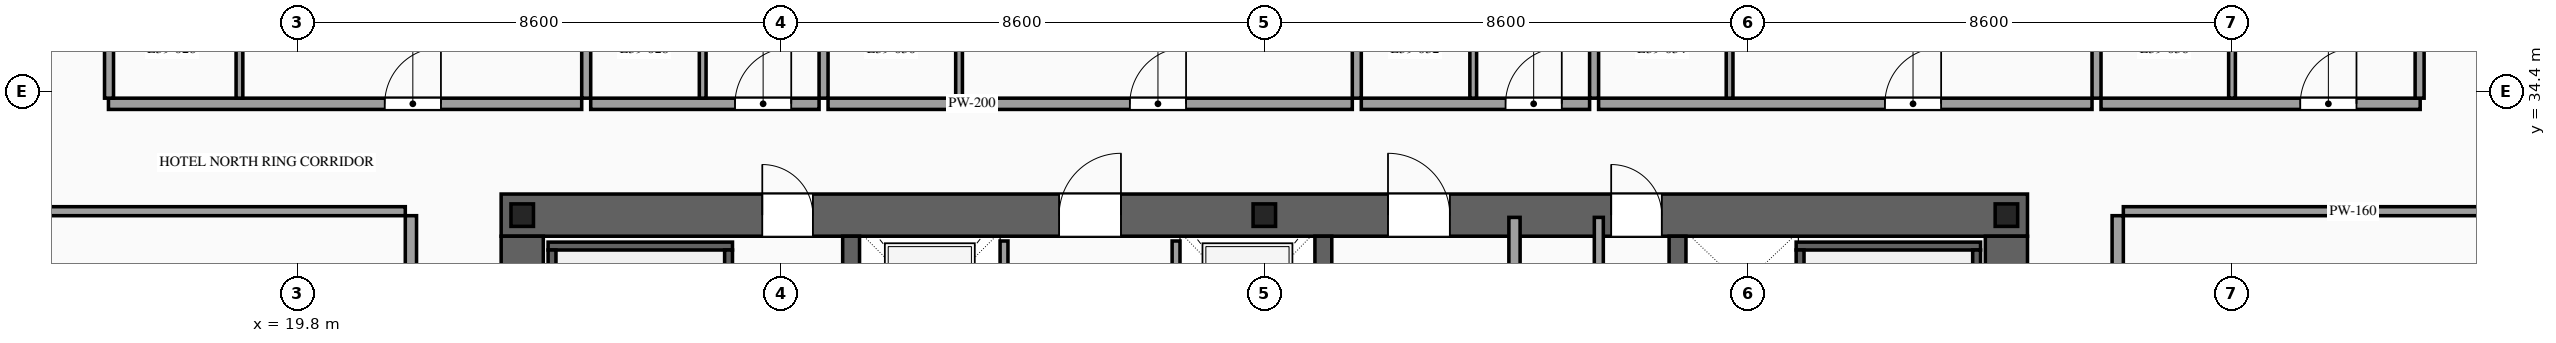
"""IFC4 building model, lengths in metres.
Left out: names, types, materials, properties, quantities, classifications, styles, units other than length and angle.
Written with IfcOpenShell. Run it as: python <this file> out.ifc"""

import sys

from ifc_helpers import new_model, si_unit, direction, frame, frame_2d, origin, origin_2d, place, context, subcontext, project, spatial, rectangle, i_section, extrude, source, transform, mapped, element, fill, save


model = new_model("IFC4")
c1 = context("Model", 3, precision=1e-05, world=origin(), true_north=direction((0.0, 1.0)))
c2 = subcontext(c1, "Body", "Model", "MODEL_VIEW")
j1 = project(units=[si_unit("LENGTHUNIT", "METRE"), si_unit("PLANEANGLEUNIT", "RADIAN")], contexts=[c1])
p1 = place(None, origin())
s1 = spatial("IfcSite", under=j1, at=p1, CompositionType="ELEMENT")
p2 = place(p1, origin())
s2 = spatial("IfcBuilding", under=s1, at=p2, CompositionType="ELEMENT")
p3 = place(p2, frame((0.0, 0.0, 148.8)))
s3 = spatial("IfcBuildingStorey", under=s2, at=p3, CompositionType="ELEMENT", Elevation=148.8)
p4 = place(p3, frame((23.425, 32.2, 0.0), z_axis=(0.0, 0.0, 1.0), x_axis=(1.0, 0.0, 0.0)))
e1 = element("IfcWall", 1, at=p4, inside=s3, PredefinedType="SHEAR", context=c2, shape_type="SweptSolid", body=[
    extrude(rectangle(XDim=27.15, YDim=0.75, at=frame_2d((13.575, 0.0))), origin(), (0.0, 0.0, 1.0), 3.6),
])
p5 = place(p4, frame((4.645, 0.0, 0.0)))
e2 = element("IfcOpeningElement", 2, at=p5, cuts=e1, PredefinedType="OPENING", context=c2, shape_type="SweptSolid", body=[
    extrude(rectangle(XDim=0.9, YDim=2.15, at=frame_2d((0.45, 1.075))), frame((0.0, 0.39, 0.0), z_axis=(0.0, -1.0, 0.0), x_axis=(1.0, 0.0, 0.0)), (0.0, 0.0, 1.0), 0.78),
])
p6 = place(p4, frame((9.925, 0.0, 0.0)))
e3 = element("IfcOpeningElement", 3, at=p6, cuts=e1, PredefinedType="OPENING", context=c2, shape_type="SweptSolid", body=[
    extrude(rectangle(XDim=1.1, YDim=2.2, at=frame_2d((0.55, 1.1))), frame((0.0, 0.39, 0.0), z_axis=(0.0, -1.0, 0.0), x_axis=(1.0, 0.0, 0.0)), (0.0, 0.0, 1.0), 0.78),
])
p7 = place(p4, frame((15.775, 0.0, 0.0)))
e4 = element("IfcOpeningElement", 4, at=p7, cuts=e1, PredefinedType="OPENING", context=c2, shape_type="SweptSolid", body=[
    extrude(rectangle(XDim=1.1, YDim=2.2, at=frame_2d((0.55, 1.1))), frame((0.0, 0.39, 0.0), z_axis=(0.0, -1.0, 0.0), x_axis=(1.0, 0.0, 0.0)), (0.0, 0.0, 1.0), 0.78),
])
p8 = place(p4, frame((19.745, 0.0, 0.0)))
e5 = element("IfcOpeningElement", 5, at=p8, cuts=e1, PredefinedType="OPENING", context=c2, shape_type="SweptSolid", body=[
    extrude(rectangle(XDim=0.9, YDim=2.15, at=frame_2d((0.45, 1.075))), frame((0.0, 0.39, 0.0), z_axis=(0.0, -1.0, 0.0), x_axis=(1.0, 0.0, 0.0)), (0.0, 0.0, 1.0), 0.78),
])
m1 = source(origin(), c2, "Body", "SweptSolid", [
    extrude(rectangle(XDim=12.05, YDim=0.75, at=frame_2d((6.025, 0.0))), origin(), (0.0, 0.0, 1.0), 3.6),
])
for number, where, z_axis, x_axis in (
    (6, (23.8, 19.775, 0.0), (0.0, 0.0, 1.0), (0.0, 1.0, 0.0)),
    (7, (50.2, 19.775, 0.0), (0.0, 0.0, 1.0), (0.0, 1.0, 0.0)),
):
    element("IfcWall", number, at=place(p3, frame(where, z_axis=z_axis, x_axis=x_axis)), inside=s3, PredefinedType="SHEAR", context=c2, shape_type="MappedRepresentation", body=[
        mapped(m1, transform((0.0, 0.0, 0.0), scale=1.0)),
    ])
m2 = source(origin(), c2, "Body", "SweptSolid", [
    extrude(rectangle(XDim=12.05, YDim=0.3, at=frame_2d((6.025, 0.0))), origin(), (0.0, 0.0, 1.0), 3.6),
])
for number, where, z_axis, x_axis in (
    (8, (29.65, 19.775, 0.0), (0.0, 0.0, 1.0), (0.0, 1.0, 0.0)),
    (9, (38.05, 19.775, 0.0), (0.0, 0.0, 1.0), (0.0, 1.0, 0.0)),
    (10, (44.35, 19.775, 0.0), (0.0, 0.0, 1.0), (0.0, 1.0, 0.0)),
):
    element("IfcWall", number, at=place(p3, frame(where, z_axis=z_axis, x_axis=x_axis)), inside=s3, PredefinedType="SOLIDWALL", context=c2, shape_type="MappedRepresentation", body=[
        mapped(m2, transform((0.0, 0.0, 0.0), scale=1.0)),
    ])
m3 = source(origin(), c2, "Body", "SweptSolid", [
    extrude(i_section(OverallWidth=0.4, OverallDepth=0.4, WebThickness=0.013, FlangeThickness=0.021, at=origin_2d()), origin(), (0.0, 0.0, 1.0), 3.6),
])
for number, where, z_axis, x_axis in (
    (11, (23.8, 32.2, 0.0), (0.0, 0.0, 1.0), (1.0, 0.0, 0.0)),
    (12, (37.0, 32.2, 0.0), (0.0, 0.0, 1.0), (1.0, 0.0, 0.0)),
    (13, (50.2, 32.2, 0.0), (0.0, 0.0, 1.0), (1.0, 0.0, 0.0)),
):
    element("IfcColumn", number, at=place(p3, frame(where, z_axis=z_axis, x_axis=x_axis)), inside=s3, PredefinedType="COLUMN", context=c2, shape_type="MappedRepresentation", body=[
        mapped(m3, transform((0.0, 0.0, 0.0), scale=1.0)),
    ])
p9 = place(p3, frame((32.37, 29.4, 0.0), z_axis=(0.0, 0.0, 1.0), x_axis=(0.0, 1.0, 0.0)))
e14 = element("IfcWall", 14, at=p9, inside=s3, PredefinedType="SOLIDWALL", context=c2, shape_type="SweptSolid", body=[
    extrude(rectangle(XDim=2.34, YDim=0.14, at=frame_2d((1.17, 0.0))), origin(), (0.0, 0.0, 1.0), 3.38),
])
p10 = place(p9, frame((0.62, 0.0, 0.0)))
e15 = element("IfcOpeningElement", 15, at=p10, cuts=e14, PredefinedType="OPENING", context=c2, shape_type="SweptSolid", body=[
    extrude(rectangle(XDim=1.1, YDim=2.2, at=frame_2d((0.55, 1.1))), frame((0.0, 0.085, 0.0), z_axis=(0.0, -1.0, 0.0), x_axis=(1.0, 0.0, 0.0)), (0.0, 0.0, 1.0), 0.17),
])
p11 = place(p3, frame((35.43, 29.4, 0.0), z_axis=(0.0, 0.0, 1.0), x_axis=(0.0, 1.0, 0.0)))
e16 = element("IfcWall", 16, at=p11, inside=s3, PredefinedType="SOLIDWALL", context=c2, shape_type="SweptSolid", body=[
    extrude(rectangle(XDim=2.34, YDim=0.14, at=frame_2d((1.17, 0.0))), origin(), (0.0, 0.0, 1.0), 3.38),
])
p12 = place(p11, frame((0.62, 0.0, 0.0)))
e17 = element("IfcOpeningElement", 17, at=p12, cuts=e16, PredefinedType="OPENING", context=c2, shape_type="SweptSolid", body=[
    extrude(rectangle(XDim=1.1, YDim=2.2, at=frame_2d((0.55, 1.1))), frame((0.0, 0.085, 0.0), z_axis=(0.0, -1.0, 0.0), x_axis=(1.0, 0.0, 0.0)), (0.0, 0.0, 1.0), 0.17),
])
m4 = source(origin(), c2, "Body", "SweptSolid", [
    extrude(rectangle(XDim=3.28, YDim=0.14, at=frame_2d((1.64, 0.0))), origin(), (0.0, 0.0, 1.0), 3.38),
])
p13 = place(p3, frame((24.26, 31.65, 0.0), z_axis=(0.0, 0.0, 1.0), x_axis=(1.0, 0.0, 0.0)))
e18 = element("IfcWall", 18, at=p13, inside=s3, PredefinedType="SOLIDWALL", context=c2, shape_type="MappedRepresentation", body=[
    mapped(m4, transform((0.0, 0.0, 0.0), scale=1.0)),
])
m5 = source(origin(), c2, "Body", "SweptSolid", [
    extrude(rectangle(XDim=8.94, YDim=0.14, at=frame_2d((4.47, 0.0))), origin(), (0.0, 0.0, 1.0), 3.38),
])
for number, where, z_axis, x_axis in (
    (19, (24.33, 22.64, 0.0), (0.0, 0.0, 1.0), (0.0, 1.0, 0.0)),
    (20, (27.47, 22.64, 0.0), (0.0, 0.0, 1.0), (0.0, 1.0, 0.0)),
):
    element("IfcWall", number, at=place(p3, frame(where, z_axis=z_axis, x_axis=x_axis)), inside=s3, PredefinedType="SOLIDWALL", context=c2, shape_type="MappedRepresentation", body=[
        mapped(m5, transform((0.0, 0.0, 0.0), scale=1.0)),
    ])
p14 = place(p3, frame((46.46, 31.65, 0.0), z_axis=(0.0, 0.0, 1.0), x_axis=(1.0, 0.0, 0.0)))
e21 = element("IfcWall", 21, at=p14, inside=s3, PredefinedType="SOLIDWALL", context=c2, shape_type="MappedRepresentation", body=[
    mapped(m4, transform((0.0, 0.0, 0.0), scale=1.0)),
])
for number, where, z_axis, x_axis in (
    (22, (46.53, 22.64, 0.0), (0.0, 0.0, 1.0), (0.0, 1.0, 0.0)),
    (23, (49.67, 22.64, 0.0), (0.0, 0.0, 1.0), (0.0, 1.0, 0.0)),
):
    element("IfcWall", number, at=place(p3, frame(where, z_axis=z_axis, x_axis=x_axis)), inside=s3, PredefinedType="SOLIDWALL", context=c2, shape_type="MappedRepresentation", body=[
        mapped(m5, transform((0.0, 0.0, 0.0), scale=1.0)),
    ])
m6 = source(origin(), c2, "Body", "SweptSolid", [
    extrude(rectangle(XDim=12.72, YDim=0.2, at=frame_2d((6.36, 0.0))), origin(), (0.0, 0.0, 1.0), 3.38),
])
p15 = place(p3, frame((41.45, 19.44, 0.0), z_axis=(0.0, 0.0, 1.0), x_axis=(0.0, 1.0, 0.0)))
e24 = element("IfcWall", 24, at=p15, inside=s3, PredefinedType="PARTITIONING", context=c2, shape_type="MappedRepresentation", body=[
    mapped(m6, transform((0.0, 0.0, 0.0), scale=1.0)),
])
m7 = source(origin(), c2, "Body", "SweptSolid", [
    extrude(rectangle(XDim=10.72, YDim=0.16, at=frame_2d((5.36, 0.0))), origin(), (0.0, 0.0, 1.0), 3.38),
])
p16 = place(p3, frame((42.95, 21.44, 0.0), z_axis=(0.0, 0.0, 1.0), x_axis=(0.0, 1.0, 0.0)))
e25 = element("IfcWall", 25, at=p16, inside=s3, PredefinedType="PARTITIONING", context=c2, shape_type="MappedRepresentation", body=[
    mapped(m7, transform((0.0, 0.0, 0.0), scale=1.0)),
])
p17 = place(p3, frame((16.44, 34.18, 0.0), z_axis=(0.0, 0.0, 1.0), x_axis=(1.0, 0.0, 0.0)))
e26 = element("IfcWall", 26, at=p17, inside=s3, PredefinedType="PARTITIONING", context=c2, shape_type="SweptSolid", body=[
    extrude(rectangle(XDim=8.418, YDim=0.2, at=frame_2d((4.209, 0.0))), origin(), (0.0, 0.0, 1.0), 3.38),
])
p18 = place(p17, frame((4.914, 0.0, 0.0)))
e27 = element("IfcOpeningElement", 27, at=p18, cuts=e26, PredefinedType="OPENING", context=c2, shape_type="SweptSolid", body=[
    extrude(rectangle(XDim=1.0, YDim=2.2, at=frame_2d((0.5, 1.1))), frame((0.0, 0.115, 0.0), z_axis=(0.0, -1.0, 0.0), x_axis=(1.0, 0.0, 0.0)), (0.0, 0.0, 1.0), 0.23),
])
m8 = source(origin(), c2, "Body", "SweptSolid", [
    extrude(rectangle(XDim=14.97, YDim=0.16, at=frame_2d((7.485, 0.0))), origin(), (0.0, 0.0, 1.0), 3.38),
])
p19 = place(p3, frame((24.938, 34.28, 0.0), z_axis=(0.0, 0.0, 1.0), x_axis=(0.0, 1.0, 0.0)))
e28 = element("IfcWall", 28, at=p19, inside=s3, PredefinedType="PARTITIONING", context=c2, shape_type="MappedRepresentation", body=[
    mapped(m8, transform((0.0, 0.0, 0.0), scale=1.0)),
])
m9 = source(origin(), c2, "Body", "SweptSolid", [
    extrude(rectangle(XDim=2.42, YDim=0.12, at=frame_2d((1.21, 0.0))), origin(), (0.0, 0.0, 1.0), 3.38),
])
p20 = place(p3, frame((18.77, 34.28, 0.0), z_axis=(0.0, 0.0, 1.0), x_axis=(0.0, 1.0, 0.0)))
e29 = element("IfcWall", 29, at=p20, inside=s3, PredefinedType="PARTITIONING", context=c2, shape_type="MappedRepresentation", body=[
    mapped(m9, transform((0.0, 0.0, 0.0), scale=1.0)),
])
p21 = place(p3, frame((25.018, 34.18, 0.0), z_axis=(0.0, 0.0, 1.0), x_axis=(1.0, 0.0, 0.0)))
e30 = element("IfcWall", 30, at=p21, inside=s3, PredefinedType="PARTITIONING", context=c2, shape_type="SweptSolid", body=[
    extrude(rectangle(XDim=4.062, YDim=0.2, at=frame_2d((2.031, 0.0))), origin(), (0.0, 0.0, 1.0), 3.38),
])
p22 = place(p21, frame((2.567, 0.0, 0.0)))
e31 = element("IfcOpeningElement", 31, at=p22, cuts=e30, PredefinedType="OPENING", context=c2, shape_type="SweptSolid", body=[
    extrude(rectangle(XDim=1.0, YDim=2.2, at=frame_2d((0.5, 1.1))), frame((0.0, 0.115, 0.0), z_axis=(0.0, -1.0, 0.0), x_axis=(1.0, 0.0, 0.0)), (0.0, 0.0, 1.0), 0.23),
])
p23 = place(p3, frame((29.16, 34.28, 0.0), z_axis=(0.0, 0.0, 1.0), x_axis=(0.0, 1.0, 0.0)))
e32 = element("IfcWall", 32, at=p23, inside=s3, PredefinedType="PARTITIONING", context=c2, shape_type="MappedRepresentation", body=[
    mapped(m8, transform((0.0, 0.0, 0.0), scale=1.0)),
])
p24 = place(p3, frame((27.01, 34.28, 0.0), z_axis=(0.0, 0.0, 1.0), x_axis=(0.0, 1.0, 0.0)))
e33 = element("IfcWall", 33, at=p24, inside=s3, PredefinedType="PARTITIONING", context=c2, shape_type="MappedRepresentation", body=[
    mapped(m9, transform((0.0, 0.0, 0.0), scale=1.0)),
])
p25 = place(p3, frame((29.24, 34.18, 0.0), z_axis=(0.0, 0.0, 1.0), x_axis=(1.0, 0.0, 0.0)))
e34 = element("IfcWall", 34, at=p25, inside=s3, PredefinedType="PARTITIONING", context=c2, shape_type="SweptSolid", body=[
    extrude(rectangle(XDim=9.325, YDim=0.2, at=frame_2d((4.663, 0.0))), origin(), (0.0, 0.0, 1.0), 3.38),
])
p26 = place(p25, frame((5.368, 0.0, 0.0)))
e35 = element("IfcOpeningElement", 35, at=p26, cuts=e34, PredefinedType="OPENING", context=c2, shape_type="SweptSolid", body=[
    extrude(rectangle(XDim=1.0, YDim=2.2, at=frame_2d((0.5, 1.1))), frame((0.0, 0.115, 0.0), z_axis=(0.0, -1.0, 0.0), x_axis=(1.0, 0.0, 0.0)), (0.0, 0.0, 1.0), 0.23),
])
p27 = place(p3, frame((38.645, 34.28, 0.0), z_axis=(0.0, 0.0, 1.0), x_axis=(0.0, 1.0, 0.0)))
e36 = element("IfcWall", 36, at=p27, inside=s3, PredefinedType="PARTITIONING", context=c2, shape_type="MappedRepresentation", body=[
    mapped(m8, transform((0.0, 0.0, 0.0), scale=1.0)),
])
p28 = place(p3, frame((31.57, 34.28, 0.0), z_axis=(0.0, 0.0, 1.0), x_axis=(0.0, 1.0, 0.0)))
e37 = element("IfcWall", 37, at=p28, inside=s3, PredefinedType="PARTITIONING", context=c2, shape_type="MappedRepresentation", body=[
    mapped(m9, transform((0.0, 0.0, 0.0), scale=1.0)),
])
p29 = place(p3, frame((38.725, 34.18, 0.0), z_axis=(0.0, 0.0, 1.0), x_axis=(1.0, 0.0, 0.0)))
e38 = element("IfcWall", 38, at=p29, inside=s3, PredefinedType="PARTITIONING", context=c2, shape_type="SweptSolid", body=[
    extrude(rectangle(XDim=4.061, YDim=0.2, at=frame_2d((2.03, 0.0))), origin(), (0.0, 0.0, 1.0), 3.38),
])
p30 = place(p29, frame((2.566, 0.0, 0.0)))
e39 = element("IfcOpeningElement", 39, at=p30, cuts=e38, PredefinedType="OPENING", context=c2, shape_type="SweptSolid", body=[
    extrude(rectangle(XDim=1.0, YDim=2.2, at=frame_2d((0.5, 1.1))), frame((0.0, 0.115, 0.0), z_axis=(0.0, -1.0, 0.0), x_axis=(1.0, 0.0, 0.0)), (0.0, 0.0, 1.0), 0.23),
])
p31 = place(p3, frame((42.866, 34.28, 0.0), z_axis=(0.0, 0.0, 1.0), x_axis=(0.0, 1.0, 0.0)))
e40 = element("IfcWall", 40, at=p31, inside=s3, PredefinedType="PARTITIONING", context=c2, shape_type="MappedRepresentation", body=[
    mapped(m8, transform((0.0, 0.0, 0.0), scale=1.0)),
])
p32 = place(p3, frame((40.716, 34.28, 0.0), z_axis=(0.0, 0.0, 1.0), x_axis=(0.0, 1.0, 0.0)))
e41 = element("IfcWall", 41, at=p32, inside=s3, PredefinedType="PARTITIONING", context=c2, shape_type="MappedRepresentation", body=[
    mapped(m9, transform((0.0, 0.0, 0.0), scale=1.0)),
])
p33 = place(p3, frame((42.946, 34.18, 0.0), z_axis=(0.0, 0.0, 1.0), x_axis=(1.0, 0.0, 0.0)))
e42 = element("IfcWall", 42, at=p33, inside=s3, PredefinedType="PARTITIONING", context=c2, shape_type="SweptSolid", body=[
    extrude(rectangle(XDim=8.777, YDim=0.2, at=frame_2d((4.388, 0.0))), origin(), (0.0, 0.0, 1.0), 3.38),
])
p34 = place(p33, frame((5.093, 0.0, 0.0)))
e43 = element("IfcOpeningElement", 43, at=p34, cuts=e42, PredefinedType="OPENING", context=c2, shape_type="SweptSolid", body=[
    extrude(rectangle(XDim=1.0, YDim=2.2, at=frame_2d((0.5, 1.1))), frame((0.0, 0.115, 0.0), z_axis=(0.0, -1.0, 0.0), x_axis=(1.0, 0.0, 0.0)), (0.0, 0.0, 1.0), 0.23),
])
p35 = place(p3, frame((51.803, 34.28, 0.0), z_axis=(0.0, 0.0, 1.0), x_axis=(0.0, 1.0, 0.0)))
e44 = element("IfcWall", 44, at=p35, inside=s3, PredefinedType="PARTITIONING", context=c2, shape_type="MappedRepresentation", body=[
    mapped(m8, transform((0.0, 0.0, 0.0), scale=1.0)),
])
p36 = place(p3, frame((45.276, 34.28, 0.0), z_axis=(0.0, 0.0, 1.0), x_axis=(0.0, 1.0, 0.0)))
e45 = element("IfcWall", 45, at=p36, inside=s3, PredefinedType="PARTITIONING", context=c2, shape_type="MappedRepresentation", body=[
    mapped(m9, transform((0.0, 0.0, 0.0), scale=1.0)),
])
p37 = place(p3, frame((51.883, 34.18, 0.0), z_axis=(0.0, 0.0, 1.0), x_axis=(1.0, 0.0, 0.0)))
e46 = element("IfcWall", 46, at=p37, inside=s3, PredefinedType="PARTITIONING", context=c2, shape_type="SweptSolid", body=[
    extrude(rectangle(XDim=5.677, YDim=0.2, at=frame_2d((2.838, 0.0))), origin(), (0.0, 0.0, 1.0), 3.38),
])
p38 = place(p37, frame((3.544, 0.0, 0.0)))
e47 = element("IfcOpeningElement", 47, at=p38, cuts=e46, PredefinedType="OPENING", context=c2, shape_type="SweptSolid", body=[
    extrude(rectangle(XDim=1.0, YDim=2.2, at=frame_2d((0.5, 1.1))), frame((0.0, 0.115, 0.0), z_axis=(0.0, -1.0, 0.0), x_axis=(1.0, 0.0, 0.0)), (0.0, 0.0, 1.0), 0.23),
])
m10 = source(origin(), c2, "Body", "SweptSolid", [
    extrude(rectangle(XDim=14.82, YDim=0.16, at=frame_2d((7.41, 0.0))), origin(), (0.0, 0.0, 1.0), 3.38),
])
for number, where, z_axis, x_axis in (
    (48, (16.45, 34.28, 0.0), (0.0, 0.0, 1.0), (0.0, 1.0, 0.0)),
    (49, (57.55, 34.28, 0.0), (0.0, 0.0, 1.0), (0.0, 1.0, 0.0)),
):
    element("IfcWall", number, at=place(p3, frame(where, z_axis=z_axis, x_axis=x_axis)), inside=s3, PredefinedType="PARTITIONING", context=c2, shape_type="MappedRepresentation", body=[
        mapped(m10, transform((0.0, 0.0, 0.0), scale=1.0)),
    ])
p39 = place(p3, frame((54.213, 34.28, 0.0), z_axis=(0.0, 0.0, 1.0), x_axis=(0.0, 1.0, 0.0)))
e50 = element("IfcWall", 50, at=p39, inside=s3, PredefinedType="PARTITIONING", context=c2, shape_type="MappedRepresentation", body=[
    mapped(m9, transform((0.0, 0.0, 0.0), scale=1.0)),
])
p40 = place(p3, frame((21.82, 25.88, 0.0), z_axis=(0.0, 0.0, 1.0), x_axis=(0.0, 1.0, 0.0)))
e51 = element("IfcWall", 51, at=p40, inside=s3, PredefinedType="PARTITIONING", context=c2, shape_type="SweptSolid", body=[
    extrude(rectangle(XDim=6.31, YDim=0.2, at=frame_2d((3.155, 0.0))), origin(), (0.0, 0.0, 1.0), 3.38),
])
p41 = place(p40, frame((2.655, 0.0, 0.0)))
e52 = element("IfcOpeningElement", 52, at=p41, cuts=e51, PredefinedType="OPENING", context=c2, shape_type="SweptSolid", body=[
    extrude(rectangle(XDim=1.0, YDim=2.2, at=frame_2d((0.5, 1.1))), frame((0.0, 0.115, 0.0), z_axis=(0.0, -1.0, 0.0), x_axis=(1.0, 0.0, 0.0)), (0.0, 0.0, 1.0), 0.23),
])
m11 = source(origin(), c2, "Body", "SweptSolid", [
    extrude(rectangle(XDim=8.17, YDim=0.16, at=frame_2d((4.085, 0.0))), origin(), (0.0, 0.0, 1.0), 2.875),
])
p42 = place(p3, frame((13.55, 32.27, 0.0), z_axis=(0.0, 0.0, 1.0), x_axis=(1.0, 0.0, 0.0)))
e53 = element("IfcWall", 53, at=p42, inside=s3, PredefinedType="PARTITIONING", context=c2, shape_type="MappedRepresentation", body=[
    mapped(m11, transform((0.0, 0.0, 0.0), scale=1.0)),
])
p43 = place(p3, frame((52.18, 25.88, 0.0), z_axis=(0.0, 0.0, 1.0), x_axis=(0.0, 1.0, 0.0)))
e54 = element("IfcWall", 54, at=p43, inside=s3, PredefinedType="PARTITIONING", context=c2, shape_type="SweptSolid", body=[
    extrude(rectangle(XDim=6.31, YDim=0.2, at=frame_2d((3.155, 0.0))), origin(), (0.0, 0.0, 1.0), 3.38),
])
p44 = place(p43, frame((3.835, 0.0, 0.0)))
e55 = element("IfcOpeningElement", 55, at=p44, cuts=e54, PredefinedType="OPENING", context=c2, shape_type="SweptSolid", body=[
    extrude(rectangle(XDim=1.0, YDim=2.2, at=frame_2d((0.5, 1.1))), frame((0.0, 0.115, 0.0), z_axis=(0.0, -1.0, 0.0), x_axis=(1.0, 0.0, 0.0)), (0.0, 0.0, 1.0), 0.23),
])
p45 = place(p3, frame((52.28, 32.27, 0.0), z_axis=(0.0, 0.0, 1.0), x_axis=(1.0, 0.0, 0.0)))
e56 = element("IfcWall", 56, at=p45, inside=s3, PredefinedType="PARTITIONING", context=c2, shape_type="MappedRepresentation", body=[
    mapped(m11, transform((0.0, 0.0, 0.0), scale=1.0)),
])
m12 = source(origin(), c2, "Body", "SweptSolid", [
    extrude(rectangle(XDim=0.9, YDim=2.15, at=frame_2d((0.45, 1.075))), frame((0.0, 0.025, 0.0), z_axis=(0.0, -1.0, 0.0), x_axis=(1.0, 0.0, 0.0)), (0.0, 0.0, 1.0), 0.05),
])
p46 = place(p5, origin())
e57 = element("IfcDoor", 57, at=p46, inside=s3, OperationType="SINGLE_SWING_LEFT", PredefinedType="DOOR", context=c2, shape_type="MappedRepresentation", body=[
    mapped(m12, transform((0.0, 0.0, 0.0), scale=1.0)),
])
fill(e2, e57)
m13 = source(origin(), c2, "Body", "SweptSolid", [
    extrude(rectangle(XDim=1.1, YDim=2.2, at=frame_2d((0.55, 1.1))), frame((0.0, 0.025, 0.0), z_axis=(0.0, -1.0, 0.0), x_axis=(1.0, 0.0, 0.0)), (0.0, 0.0, 1.0), 0.05),
])
p47 = place(p6, origin())
e58 = element("IfcDoor", 58, at=p47, inside=s3, OperationType="SINGLE_SWING_RIGHT", PredefinedType="DOOR", context=c2, shape_type="MappedRepresentation", body=[
    mapped(m13, transform((0.0, 0.0, 0.0), scale=1.0)),
])
fill(e3, e58)
p48 = place(p7, origin())
e59 = element("IfcDoor", 59, at=p48, inside=s3, OperationType="SINGLE_SWING_LEFT", PredefinedType="DOOR", context=c2, shape_type="MappedRepresentation", body=[
    mapped(m13, transform((0.0, 0.0, 0.0), scale=1.0)),
])
fill(e4, e59)
p49 = place(p8, origin())
e60 = element("IfcDoor", 60, at=p49, inside=s3, OperationType="SINGLE_SWING_LEFT", PredefinedType="DOOR", context=c2, shape_type="MappedRepresentation", body=[
    mapped(m12, transform((0.0, 0.0, 0.0), scale=1.0)),
])
fill(e5, e60)
m14 = source(origin(), c2, "Body", "SweptSolid", [
    extrude(rectangle(XDim=1.0, YDim=2.2, at=frame_2d((0.5, 1.1))), frame((0.0, 0.025, 0.0), z_axis=(0.0, -1.0, 0.0), x_axis=(1.0, 0.0, 0.0)), (0.0, 0.0, 1.0), 0.05),
])
p50 = place(p18, origin())
e61 = element("IfcDoor", 61, at=p50, inside=s3, OperationType="SINGLE_SWING_RIGHT", PredefinedType="DOOR", context=c2, shape_type="MappedRepresentation", body=[
    mapped(m14, transform((0.0, 0.0, 0.0), scale=1.0)),
])
fill(e27, e61)
p51 = place(p22, origin())
e62 = element("IfcDoor", 62, at=p51, inside=s3, OperationType="SINGLE_SWING_RIGHT", PredefinedType="DOOR", context=c2, shape_type="MappedRepresentation", body=[
    mapped(m14, transform((0.0, 0.0, 0.0), scale=1.0)),
])
fill(e31, e62)
p52 = place(p26, origin())
e63 = element("IfcDoor", 63, at=p52, inside=s3, OperationType="SINGLE_SWING_RIGHT", PredefinedType="DOOR", context=c2, shape_type="MappedRepresentation", body=[
    mapped(m14, transform((0.0, 0.0, 0.0), scale=1.0)),
])
fill(e35, e63)
p53 = place(p30, origin())
e64 = element("IfcDoor", 64, at=p53, inside=s3, OperationType="SINGLE_SWING_RIGHT", PredefinedType="DOOR", context=c2, shape_type="MappedRepresentation", body=[
    mapped(m14, transform((0.0, 0.0, 0.0), scale=1.0)),
])
fill(e39, e64)
p54 = place(p34, origin())
e65 = element("IfcDoor", 65, at=p54, inside=s3, OperationType="SINGLE_SWING_RIGHT", PredefinedType="DOOR", context=c2, shape_type="MappedRepresentation", body=[
    mapped(m14, transform((0.0, 0.0, 0.0), scale=1.0)),
])
fill(e43, e65)
p55 = place(p38, origin())
e66 = element("IfcDoor", 66, at=p55, inside=s3, OperationType="SINGLE_SWING_RIGHT", PredefinedType="DOOR", context=c2, shape_type="MappedRepresentation", body=[
    mapped(m14, transform((0.0, 0.0, 0.0), scale=1.0)),
])
fill(e47, e66)
save(model, sys.argv[1])
